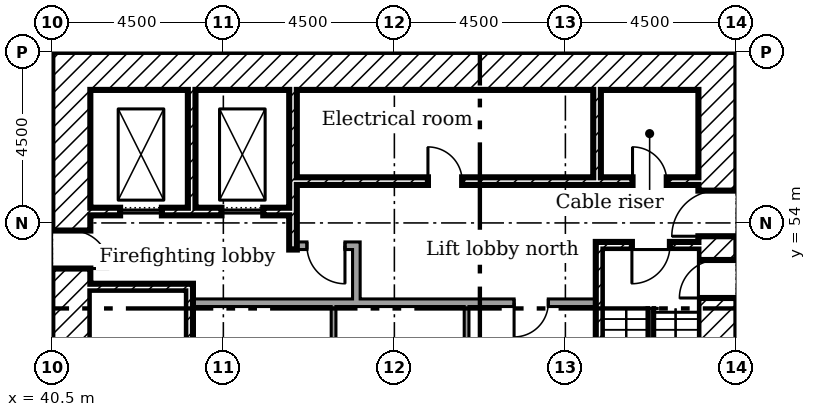
"""IFC4 building model, lengths in metres.
Left out: names, types, materials, properties, quantities, classifications, styles, units other than length and angle.
Written with IfcOpenShell. Run it as: python <this file> out.ifc"""

import sys

from ifc_helpers import new_model, si_unit, direction, frame, frame_2d, origin, place, context, subcontext, project, spatial, rectangle, extrude, element, fill, save


model = new_model("IFC4")
c1 = context("Model", 3, precision=1e-05, world=origin(), true_north=direction((0.0, 1.0)))
c2 = subcontext(c1, "Body", "Model", "MODEL_VIEW")
j1 = project(units=[si_unit("LENGTHUNIT", "METRE"), si_unit("PLANEANGLEUNIT", "RADIAN")], contexts=[c1])
p1 = place(None, origin())
s1 = spatial("IfcSite", under=j1, at=p1, CompositionType="ELEMENT")
p2 = place(p1, origin())
s2 = spatial("IfcBuilding", under=s1, at=p2, CompositionType="ELEMENT")
p3 = place(p2, origin())
s3 = spatial("IfcBuildingStorey", under=s2, at=p3, CompositionType="ELEMENT", Elevation=0.0)
p4 = place(p3, frame((58.0, 40.5, 0.0), z_axis=(0.0, 0.0, 1.0), x_axis=(0.0, 1.0, 0.0)))
e1 = element("IfcWall", 1, at=p4, inside=s3, PredefinedType="SHEAR", context=c2, shape_type="SweptSolid", body=[
    extrude(rectangle(XDim=18.0, YDim=1.0, at=frame_2d((9.0, 0.0))), origin(), (0.0, 0.0, 1.0), 5.5),
])
p5 = place(p4, frame((13.15, 0.0, 0.0)))
e2 = element("IfcOpeningElement", 2, at=p5, cuts=e1, PredefinedType="OPENING", context=c2, shape_type="SweptSolid", body=[
    extrude(rectangle(XDim=1.2, YDim=2.1, at=frame_2d((0.6, 1.05))), frame((0.0, 0.51, 0.0), z_axis=(0.0, -1.0, 0.0), x_axis=(1.0, 0.0, 0.0)), (0.0, 0.0, 1.0), 1.02),
])
p6 = place(p4, frame((3.9, 0.0, 0.0)))
e3 = element("IfcOpeningElement", 3, at=p6, cuts=e1, PredefinedType="OPENING", context=c2, shape_type="SweptSolid", body=[
    extrude(rectangle(XDim=1.8, YDim=2.1, at=frame_2d((0.9, 1.05))), frame((0.0, 0.51, 0.0), z_axis=(0.0, -1.0, 0.0), x_axis=(1.0, 0.0, 0.0)), (0.0, 0.0, 1.0), 1.02),
])
p7 = place(p4, frame((11.525, 0.0, 0.0)))
e4 = element("IfcOpeningElement", 4, at=p7, cuts=e1, PredefinedType="OPENING", context=c2, shape_type="SweptSolid", body=[
    extrude(rectangle(XDim=1.0, YDim=2.1, at=frame_2d((0.5, 1.05))), frame((0.0, 0.51, 0.0), z_axis=(0.0, -1.0, 0.0), x_axis=(1.0, 0.0, 0.0)), (0.0, 0.0, 1.0), 1.02),
])
p8 = place(p3, frame((41.5, 58.0, 0.0)))
e5 = element("IfcWall", 5, at=p8, inside=s3, PredefinedType="SHEAR", context=c2, shape_type="SweptSolid", body=[
    extrude(rectangle(XDim=16.0, YDim=1.0, at=frame_2d((8.0, 0.0))), origin(), (0.0, 0.0, 1.0), 5.5),
])
p9 = place(p3, frame((41.0, 40.5, 0.0), z_axis=(0.0, 0.0, 1.0), x_axis=(0.0, 1.0, 0.0)))
e6 = element("IfcWall", 6, at=p9, inside=s3, PredefinedType="SHEAR", context=c2, shape_type="SweptSolid", body=[
    extrude(rectangle(XDim=18.0, YDim=1.0, at=frame_2d((9.0, 0.0))), origin(), (0.0, 0.0, 1.0), 5.5),
])
p10 = place(p9, frame((3.65, 0.0, 0.0)))
e7 = element("IfcOpeningElement", 7, at=p10, cuts=e6, PredefinedType="OPENING", context=c2, shape_type="SweptSolid", body=[
    extrude(rectangle(XDim=1.2, YDim=2.1, at=frame_2d((0.6, 1.05))), frame((0.0, 0.51, 0.0), z_axis=(0.0, -1.0, 0.0), x_axis=(1.0, 0.0, 0.0)), (0.0, 0.0, 1.0), 1.02),
])
p11 = place(p9, frame((5.475, 0.0, 0.0)))
e8 = element("IfcOpeningElement", 8, at=p11, cuts=e6, PredefinedType="OPENING", context=c2, shape_type="SweptSolid", body=[
    extrude(rectangle(XDim=1.0, YDim=2.1, at=frame_2d((0.5, 1.05))), frame((0.0, 0.51, 0.0), z_axis=(0.0, -1.0, 0.0), x_axis=(1.0, 0.0, 0.0)), (0.0, 0.0, 1.0), 1.02),
])
p12 = place(p9, frame((12.3, 0.0, 0.0)))
e9 = element("IfcOpeningElement", 9, at=p12, cuts=e6, PredefinedType="OPENING", context=c2, shape_type="SweptSolid", body=[
    extrude(rectangle(XDim=1.0, YDim=2.1, at=frame_2d((0.5, 1.05))), frame((0.0, 0.51, 0.0), z_axis=(0.0, -1.0, 0.0), x_axis=(1.0, 0.0, 0.0)), (0.0, 0.0, 1.0), 1.02),
])
p13 = place(p3, frame((44.167, 57.5, 0.0), z_axis=(0.0, 0.0, 1.0), x_axis=(0.0, -1.0, 0.0)))
e10 = element("IfcWall", 10, at=p13, inside=s3, PredefinedType="SHEAR", context=c2, shape_type="SweptSolid", body=[
    extrude(rectangle(XDim=3.1, YDim=0.2, at=frame_2d((1.55, 0.0))), origin(), (0.0, 0.0, 1.0), 5.5),
])
p14 = place(p3, frame((46.833, 57.5, 0.0), z_axis=(0.0, 0.0, 1.0), x_axis=(0.0, -1.0, 0.0)))
e11 = element("IfcWall", 11, at=p14, inside=s3, PredefinedType="SHEAR", context=c2, shape_type="SweptSolid", body=[
    extrude(rectangle(XDim=4.2, YDim=0.2, at=frame_2d((2.1, 0.0))), origin(), (0.0, 0.0, 1.0), 5.5),
])
p15 = place(p3, frame((54.833, 57.5, 0.0), z_axis=(0.0, 0.0, 1.0), x_axis=(0.0, -1.0, 0.0)))
e12 = element("IfcWall", 12, at=p15, inside=s3, PredefinedType="SHEAR", context=c2, shape_type="SweptSolid", body=[
    extrude(rectangle(XDim=2.3, YDim=0.2, at=frame_2d((1.15, 0.0))), origin(), (0.0, 0.0, 1.0), 5.5),
])
p16 = place(p3, frame((48.5, 51.9, 0.0), z_axis=(0.0, 0.0, 1.0), x_axis=(0.0, 1.0, 0.0)))
e13 = element("IfcWall", 13, at=p16, inside=s3, PredefinedType="PARTITIONING", context=c2, shape_type="SweptSolid", body=[
    extrude(rectangle(XDim=1.6, YDim=0.2, at=frame_2d((0.8, 0.0))), origin(), (0.0, 0.0, 1.0), 5.5),
])
p17 = place(p3, frame((46.933, 53.4, 0.0)))
e14 = element("IfcWall", 14, at=p17, inside=s3, PredefinedType="PARTITIONING", context=c2, shape_type="SweptSolid", body=[
    extrude(rectangle(XDim=1.467, YDim=0.2, at=frame_2d((0.733, 0.0))), origin(), (0.0, 0.0, 1.0), 5.5),
])
p18 = place(p17, frame((0.267, 0.0, 0.0)))
e15 = element("IfcOpeningElement", 15, at=p18, cuts=e14, PredefinedType="OPENING", context=c2, shape_type="SweptSolid", body=[
    extrude(rectangle(XDim=1.0, YDim=2.1, at=frame_2d((0.5, 1.05))), frame((0.0, 0.11, 0.0), z_axis=(0.0, -1.0, 0.0), x_axis=(1.0, 0.0, 0.0)), (0.0, 0.0, 1.0), 0.22),
])
p19 = place(p3, frame((46.933, 55.1, 0.0)))
e16 = element("IfcWall", 16, at=p19, inside=s3, PredefinedType="SHEAR", context=c2, shape_type="SweptSolid", body=[
    extrude(rectangle(XDim=10.567, YDim=0.2, at=frame_2d((5.283, 0.0))), origin(), (0.0, 0.0, 1.0), 5.5),
])
p20 = place(p19, frame((8.833, 0.0, 0.0)))
e17 = element("IfcOpeningElement", 17, at=p20, cuts=e16, PredefinedType="OPENING", context=c2, shape_type="SweptSolid", body=[
    extrude(rectangle(XDim=0.9, YDim=2.1, at=frame_2d((0.45, 1.05))), frame((0.0, 0.11, 0.0), z_axis=(0.0, -1.0, 0.0), x_axis=(1.0, 0.0, 0.0)), (0.0, 0.0, 1.0), 0.22),
])
p21 = place(p19, frame((3.45, 0.0, 0.0)))
e18 = element("IfcOpeningElement", 18, at=p21, cuts=e16, PredefinedType="OPENING", context=c2, shape_type="SweptSolid", body=[
    extrude(rectangle(XDim=0.9, YDim=2.1, at=frame_2d((0.45, 1.05))), frame((0.0, 0.11, 0.0), z_axis=(0.0, -1.0, 0.0), x_axis=(1.0, 0.0, 0.0)), (0.0, 0.0, 1.0), 0.22),
])
p22 = place(p3, frame((41.5, 54.3, 0.0)))
e19 = element("IfcWall", 19, at=p22, inside=s3, PredefinedType="SHEAR", context=c2, shape_type="SweptSolid", body=[
    extrude(rectangle(XDim=5.233, YDim=0.2, at=frame_2d((2.617, 0.0))), origin(), (0.0, 0.0, 1.0), 5.5),
])
p23 = place(p22, frame((0.783, 0.0, 0.0)))
e20 = element("IfcOpeningElement", 20, at=p23, cuts=e19, PredefinedType="OPENING", context=c2, shape_type="SweptSolid", body=[
    extrude(rectangle(XDim=1.1, YDim=2.1, at=frame_2d((0.55, 1.05))), frame((0.0, 0.11, 0.0), z_axis=(0.0, -1.0, 0.0), x_axis=(1.0, 0.0, 0.0)), (0.0, 0.0, 1.0), 0.22),
])
p24 = place(p22, frame((3.45, 0.0, 0.0)))
e21 = element("IfcOpeningElement", 21, at=p24, cuts=e19, PredefinedType="OPENING", context=c2, shape_type="SweptSolid", body=[
    extrude(rectangle(XDim=1.1, YDim=2.1, at=frame_2d((0.55, 1.05))), frame((0.0, 0.11, 0.0), z_axis=(0.0, -1.0, 0.0), x_axis=(1.0, 0.0, 0.0)), (0.0, 0.0, 1.0), 0.22),
])
p25 = place(p3, frame((44.1, 45.5, 0.0), z_axis=(0.0, 0.0, 1.0), x_axis=(0.0, 1.0, 0.0)))
e22 = element("IfcWall", 22, at=p25, inside=s3, PredefinedType="SHEAR", context=c2, shape_type="SweptSolid", body=[
    extrude(rectangle(XDim=6.9, YDim=0.2, at=frame_2d((3.45, 0.0))), origin(), (0.0, 0.0, 1.0), 5.5),
])
p26 = place(p3, frame((41.5, 52.3, 0.0)))
e23 = element("IfcWall", 23, at=p26, inside=s3, PredefinedType="SHEAR", context=c2, shape_type="SweptSolid", body=[
    extrude(rectangle(XDim=2.5, YDim=0.2, at=frame_2d((1.25, 0.0))), origin(), (0.0, 0.0, 1.0), 5.5),
])
p27 = place(p3, frame((54.8, 53.4, 0.0)))
e24 = element("IfcWall", 24, at=p27, inside=s3, PredefinedType="SHEAR", context=c2, shape_type="SweptSolid", body=[
    extrude(rectangle(XDim=2.7, YDim=0.2, at=frame_2d((1.35, 0.0))), origin(), (0.0, 0.0, 1.0), 5.5),
])
p28 = place(p27, frame((0.95, 0.0, 0.0)))
e25 = element("IfcOpeningElement", 25, at=p28, cuts=e24, PredefinedType="OPENING", context=c2, shape_type="SweptSolid", body=[
    extrude(rectangle(XDim=1.0, YDim=2.1, at=frame_2d((0.5, 1.05))), frame((0.0, 0.11, 0.0), z_axis=(0.0, -1.0, 0.0), x_axis=(1.0, 0.0, 0.0)), (0.0, 0.0, 1.0), 0.22),
])
p29 = place(p3, frame((54.9, 46.8, 0.0), z_axis=(0.0, 0.0, 1.0), x_axis=(0.0, 1.0, 0.0)))
e26 = element("IfcWall", 26, at=p29, inside=s3, PredefinedType="SHEAR", context=c2, shape_type="SweptSolid", body=[
    extrude(rectangle(XDim=6.5, YDim=0.2, at=frame_2d((3.25, 0.0))), origin(), (0.0, 0.0, 1.0), 5.5),
])
p30 = place(p3, frame((44.2, 51.9, 0.0)))
e27 = element("IfcWall", 27, at=p30, inside=s3, PredefinedType="PARTITIONING", context=c2, shape_type="SweptSolid", body=[
    extrude(rectangle(XDim=10.6, YDim=0.2, at=frame_2d((5.3, 0.0))), origin(), (0.0, 0.0, 1.0), 5.5),
])
p31 = place(p30, frame((8.45, 0.0, 0.0)))
e28 = element("IfcOpeningElement", 28, at=p31, cuts=e27, PredefinedType="OPENING", context=c2, shape_type="SweptSolid", body=[
    extrude(rectangle(XDim=0.9, YDim=2.1, at=frame_2d((0.45, 1.05))), frame((0.0, 0.11, 0.0), z_axis=(0.0, -1.0, 0.0), x_axis=(1.0, 0.0, 0.0)), (0.0, 0.0, 1.0), 0.22),
])
p32 = place(p3, frame((47.9, 46.8, 0.0), z_axis=(0.0, 0.0, 1.0), x_axis=(0.0, 1.0, 0.0)))
e29 = element("IfcWall", 29, at=p32, inside=s3, PredefinedType="PARTITIONING", context=c2, shape_type="SweptSolid", body=[
    extrude(rectangle(XDim=5.0, YDim=0.125, at=frame_2d((2.5, 0.0))), origin(), (0.0, 0.0, 1.0), 5.5),
])
p33 = place(p3, frame((51.4, 49.5, 0.0), z_axis=(0.0, 0.0, 1.0), x_axis=(0.0, 1.0, 0.0)))
e30 = element("IfcWall", 30, at=p33, inside=s3, PredefinedType="PARTITIONING", context=c2, shape_type="SweptSolid", body=[
    extrude(rectangle(XDim=2.3, YDim=0.125, at=frame_2d((1.15, 0.0))), origin(), (0.0, 0.0, 1.0), 5.5),
])
p34 = place(p5, origin())
e31 = element("IfcDoor", 31, at=p34, inside=s3, OperationType="SINGLE_SWING_RIGHT", PredefinedType="DOOR", context=c2, shape_type="SweptSolid", body=[
    extrude(rectangle(XDim=1.2, YDim=2.1, at=frame_2d((0.6, 1.05))), frame((0.0, 0.025, 0.0), z_axis=(0.0, -1.0, 0.0), x_axis=(1.0, 0.0, 0.0)), (0.0, 0.0, 1.0), 0.05),
])
fill(e2, e31)
p35 = place(p28, frame((1.0, 0.0, 0.0), x_axis=(-1.0, 0.0, 0.0)))
e32 = element("IfcDoor", 32, at=p35, inside=s3, OperationType="SINGLE_SWING_LEFT", PredefinedType="DOOR", context=c2, shape_type="SweptSolid", body=[
    extrude(rectangle(XDim=1.0, YDim=2.1, at=frame_2d((0.5, 1.05))), frame((0.0, 0.025, 0.0), z_axis=(0.0, -1.0, 0.0), x_axis=(1.0, 0.0, 0.0)), (0.0, 0.0, 1.0), 0.05),
])
fill(e25, e32)
p36 = place(p7, origin())
e33 = element("IfcDoor", 33, at=p36, inside=s3, OperationType="SINGLE_SWING_RIGHT", PredefinedType="DOOR", context=c2, shape_type="SweptSolid", body=[
    extrude(rectangle(XDim=1.0, YDim=2.1, at=frame_2d((0.5, 1.05))), frame((0.0, 0.025, 0.0), z_axis=(0.0, -1.0, 0.0), x_axis=(1.0, 0.0, 0.0)), (0.0, 0.0, 1.0), 0.05),
])
fill(e4, e33)
p37 = place(p18, frame((1.0, 0.0, 0.0), x_axis=(-1.0, 0.0, 0.0)))
e34 = element("IfcDoor", 34, at=p37, inside=s3, OperationType="SINGLE_SWING_RIGHT", PredefinedType="DOOR", context=c2, shape_type="SweptSolid", body=[
    extrude(rectangle(XDim=1.0, YDim=2.1, at=frame_2d((0.5, 1.05))), frame((0.0, 0.025, 0.0), z_axis=(0.0, -1.0, 0.0), x_axis=(1.0, 0.0, 0.0)), (0.0, 0.0, 1.0), 0.05),
])
fill(e15, e34)
p38 = place(p12, frame((1.0, 0.0, 0.0), x_axis=(-1.0, 0.0, 0.0)))
e35 = element("IfcDoor", 35, at=p38, inside=s3, OperationType="SINGLE_SWING_LEFT", PredefinedType="DOOR", context=c2, shape_type="SweptSolid", body=[
    extrude(rectangle(XDim=1.0, YDim=2.1, at=frame_2d((0.5, 1.05))), frame((0.0, 0.025, 0.0), z_axis=(0.0, -1.0, 0.0), x_axis=(1.0, 0.0, 0.0)), (0.0, 0.0, 1.0), 0.05),
])
fill(e9, e35)
p39 = place(p20, origin())
e36 = element("IfcDoor", 36, at=p39, inside=s3, OperationType="SINGLE_SWING_RIGHT", PredefinedType="DOOR", context=c2, shape_type="SweptSolid", body=[
    extrude(rectangle(XDim=0.9, YDim=2.1, at=frame_2d((0.45, 1.05))), frame((0.0, 0.025, 0.0), z_axis=(0.0, -1.0, 0.0), x_axis=(1.0, 0.0, 0.0)), (0.0, 0.0, 1.0), 0.05),
])
fill(e17, e36)
p40 = place(p21, origin())
e37 = element("IfcDoor", 37, at=p40, inside=s3, OperationType="SINGLE_SWING_RIGHT", PredefinedType="DOOR", context=c2, shape_type="SweptSolid", body=[
    extrude(rectangle(XDim=0.9, YDim=2.1, at=frame_2d((0.45, 1.05))), frame((0.0, 0.025, 0.0), z_axis=(0.0, -1.0, 0.0), x_axis=(1.0, 0.0, 0.0)), (0.0, 0.0, 1.0), 0.05),
])
fill(e18, e37)
p41 = place(p31, frame((0.9, 0.0, 0.0), x_axis=(-1.0, 0.0, 0.0)))
e38 = element("IfcDoor", 38, at=p41, inside=s3, OperationType="SINGLE_SWING_LEFT", PredefinedType="DOOR", context=c2, shape_type="SweptSolid", body=[
    extrude(rectangle(XDim=0.9, YDim=2.1, at=frame_2d((0.45, 1.05))), frame((0.0, 0.025, 0.0), z_axis=(0.0, -1.0, 0.0), x_axis=(1.0, 0.0, 0.0)), (0.0, 0.0, 1.0), 0.05),
])
fill(e28, e38)
p42 = place(p23, origin())
e39 = element("IfcDoor", 39, at=p42, inside=s3, OperationType="SLIDING_TO_LEFT", PredefinedType="DOOR", context=c2, shape_type="SweptSolid", body=[
    extrude(rectangle(XDim=1.1, YDim=2.1, at=frame_2d((0.55, 1.05))), frame((0.0, 0.025, 0.0), z_axis=(0.0, -1.0, 0.0), x_axis=(1.0, 0.0, 0.0)), (0.0, 0.0, 1.0), 0.05),
])
fill(e20, e39)
p43 = place(p24, origin())
e40 = element("IfcDoor", 40, at=p43, inside=s3, OperationType="SLIDING_TO_LEFT", PredefinedType="DOOR", context=c2, shape_type="SweptSolid", body=[
    extrude(rectangle(XDim=1.1, YDim=2.1, at=frame_2d((0.55, 1.05))), frame((0.0, 0.025, 0.0), z_axis=(0.0, -1.0, 0.0), x_axis=(1.0, 0.0, 0.0)), (0.0, 0.0, 1.0), 0.05),
])
fill(e21, e40)
save(model, sys.argv[1])
